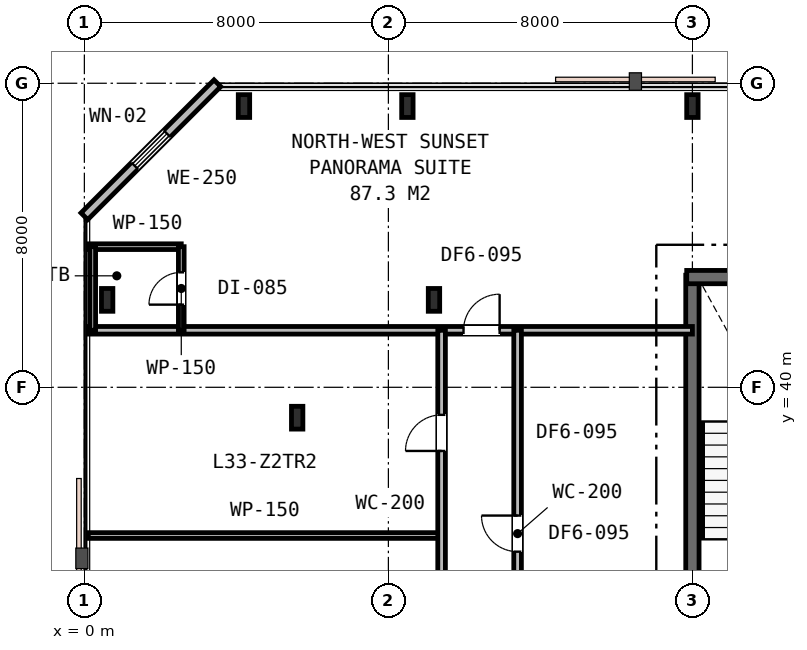
"""IFC4 building model, lengths in metres.
Left out: names, types, materials, properties, quantities, classifications, styles, units other than length and angle.
Written with IfcOpenShell. Run it as: python <this file> out.ifc"""

import sys

from ifc_helpers import new_model, si_unit, direction, frame, frame_2d, origin, origin_2d, place, context, subcontext, project, spatial, rectangle, i_section, extrude, element, fill, save


model = new_model("IFC4")
c1 = context("Model", 3, precision=1e-05, world=origin(), true_north=direction((0.0, 1.0)))
c2 = subcontext(c1, "Body", "Model", "MODEL_VIEW")
j1 = project(units=[si_unit("LENGTHUNIT", "METRE"), si_unit("PLANEANGLEUNIT", "RADIAN")], contexts=[c1])
p1 = place(None, origin())
s1 = spatial("IfcSite", under=j1, at=p1, CompositionType="ELEMENT")
p2 = place(p1, origin())
s2 = spatial("IfcBuilding", under=s1, at=p2, CompositionType="ELEMENT")
p3 = place(p2, frame((0.0, 0.0, 129.6)))
s3 = spatial("IfcBuildingStorey", under=s2, at=p3, CompositionType="ELEMENT", Elevation=129.6)
p4 = place(p3, frame((16.0, 30.65, 0.0), z_axis=(0.0, 0.0, 1.0), x_axis=(0.0, 1.0, 0.0)))
e1 = element("IfcWall", 1, at=p4, inside=s3, PredefinedType="SHEAR", context=c2, shape_type="SweptSolid", body=[
    extrude(rectangle(XDim=12.3, YDim=0.35, at=frame_2d((6.15, 0.0))), origin(), (0.0, 0.0, 1.0), 3.6),
])
p5 = place(p3, frame((15.85, 42.9, 0.0), z_axis=(0.0, 0.0, 1.0), x_axis=(1.0, 0.0, 0.0)))
e2 = element("IfcWall", 2, at=p5, inside=s3, PredefinedType="SHEAR", context=c2, shape_type="SweptSolid", body=[
    extrude(rectangle(XDim=24.3, YDim=0.35, at=frame_2d((12.15, 0.0))), origin(), (0.0, 0.0, 1.0), 3.6),
])
for number, where, z_axis, x_axis in (
    (3, (5.6, 39.2, 0.0), (0.0, 0.0, 1.0), (1.0, 0.0, 0.0)),
    (4, (9.2, 42.3, 0.0), (0.0, 0.0, 1.0), (1.0, 0.0, 0.0)),
    (5, (0.6, 42.3, 0.0), (0.0, 0.0, 1.0), (1.0, 0.0, 0.0)),
    (6, (4.2, 47.4, 0.0), (0.0, 0.0, 1.0), (1.0, 0.0, 0.0)),
    (7, (8.5, 47.4, 0.0), (0.0, 0.0, 1.0), (1.0, 0.0, 0.0)),
    (8, (16.0, 47.4, 0.0), (0.0, 0.0, 1.0), (1.0, 0.0, 0.0)),
):
    element("IfcColumn", number, at=place(p3, frame(where, z_axis=z_axis, x_axis=x_axis)), inside=s3, PredefinedType="COLUMN", context=c2, shape_type="SweptSolid", body=[
        extrude(i_section(OverallWidth=0.3, OverallDepth=0.6, WebThickness=0.015, FlangeThickness=0.03, FilletRadius=0.027, at=origin_2d()), origin(), (0.0, 0.0, 1.0), 3.6),
    ])
p6 = place(p3, frame((3.5, 48.0, 0.0), z_axis=(0.0, 0.0, 1.0), x_axis=(-0.707106781187, -0.707106781187, 0.0)))
e9 = element("IfcWall", 9, at=p6, inside=s3, PredefinedType="STANDARD", context=c2, shape_type="SweptSolid", body=[
    extrude(rectangle(XDim=4.95, YDim=0.25, at=frame_2d((2.475, 0.0))), origin(), (0.0, 0.0, 1.0), 3.33),
])
p7 = place(p6, frame((1.875, 0.0, 0.85)))
e10 = element("IfcOpeningElement", 10, at=p7, cuts=e9, PredefinedType="OPENING", context=c2, shape_type="SweptSolid", body=[
    extrude(rectangle(XDim=1.2, YDim=1.6, at=frame_2d((0.6, 0.8))), frame((0.0, 0.135, 0.0), z_axis=(0.0, -1.0, 0.0), x_axis=(1.0, 0.0, 0.0)), (0.0, 0.0, 1.0), 0.27),
])
p8 = place(p3, frame((0.1, 41.5, 0.0), z_axis=(0.0, 0.0, 1.0), x_axis=(1.0, 0.0, 0.0)))
e11 = element("IfcWall", 11, at=p8, inside=s3, PredefinedType="PARTITIONING", context=c2, shape_type="SweptSolid", body=[
    extrude(rectangle(XDim=15.9, YDim=0.2, at=frame_2d((7.95, 0.0))), origin(), (0.0, 0.0, 1.0), 2.87),
])
p9 = place(p8, frame((9.877, 0.0, 0.0)))
e12 = element("IfcOpeningElement", 12, at=p9, cuts=e11, PredefinedType="OPENING", context=c2, shape_type="SweptSolid", body=[
    extrude(rectangle(XDim=0.95, YDim=2.15, at=frame_2d((0.475, 1.075))), frame((0.0, 0.11, 0.0), z_axis=(0.0, -1.0, 0.0), x_axis=(1.0, 0.0, 0.0)), (0.0, 0.0, 1.0), 0.22),
])
p10 = place(p3, frame((0.1, 43.7, 0.0), z_axis=(0.0, 0.0, 1.0), x_axis=(1.0, 0.0, 0.0)))
e13 = element("IfcWall", 13, at=p10, inside=s3, PredefinedType="PARTITIONING", context=c2, shape_type="SweptSolid", body=[
    extrude(rectangle(XDim=2.45, YDim=0.15, at=frame_2d((1.225, 0.0))), origin(), (0.0, 0.0, 1.0), 3.33),
])
p11 = place(p3, frame((2.55, 41.5, 0.0), z_axis=(0.0, 0.0, 1.0), x_axis=(0.0, 1.0, 0.0)))
e14 = element("IfcWall", 14, at=p11, inside=s3, PredefinedType="PARTITIONING", context=c2, shape_type="SweptSolid", body=[
    extrude(rectangle(XDim=2.2, YDim=0.15, at=frame_2d((1.1, 0.0))), origin(), (0.0, 0.0, 1.0), 2.87),
])
p12 = place(p11, frame((0.675, 0.0, 0.0)))
e15 = element("IfcOpeningElement", 15, at=p12, cuts=e14, PredefinedType="OPENING", context=c2, shape_type="SweptSolid", body=[
    extrude(rectangle(XDim=0.85, YDim=2.15, at=frame_2d((0.425, 1.075))), frame((0.0, 0.085, 0.0), z_axis=(0.0, -1.0, 0.0), x_axis=(1.0, 0.0, 0.0)), (0.0, 0.0, 1.0), 0.17),
])
p13 = place(p3, frame((0.22, 41.5, 0.0), z_axis=(0.0, 0.0, 1.0), x_axis=(0.0, 1.0, 0.0)))
e16 = element("IfcWall", 16, at=p13, inside=s3, PredefinedType="PARTITIONING", context=c2, shape_type="SweptSolid", body=[
    extrude(rectangle(XDim=2.2, YDim=0.15, at=frame_2d((1.1, 0.0))), origin(), (0.0, 0.0, 1.0), 2.87),
])
p14 = place(p3, frame((0.1, 36.1, 0.0), z_axis=(0.0, 0.0, 1.0), x_axis=(1.0, 0.0, 0.0)))
e17 = element("IfcWall", 17, at=p14, inside=s3, PredefinedType="PARTITIONING", context=c2, shape_type="SweptSolid", body=[
    extrude(rectangle(XDim=9.3, YDim=0.15, at=frame_2d((4.65, 0.0))), origin(), (0.0, 0.0, 1.0), 2.87),
])
p15 = place(p3, frame((9.4, 30.8, 0.0), z_axis=(0.0, 0.0, 1.0), x_axis=(0.0, 1.0, 0.0)))
e18 = element("IfcWall", 18, at=p15, inside=s3, PredefinedType="PARTITIONING", context=c2, shape_type="SweptSolid", body=[
    extrude(rectangle(XDim=10.7, YDim=0.2, at=frame_2d((5.35, 0.0))), origin(), (0.0, 0.0, 1.0), 2.87),
])
p16 = place(p15, frame((2.175, 0.0, 0.0)))
e19 = element("IfcOpeningElement", 19, at=p16, cuts=e18, PredefinedType="OPENING", context=c2, shape_type="SweptSolid", body=[
    extrude(rectangle(XDim=0.95, YDim=2.15, at=frame_2d((0.475, 1.075))), frame((0.0, 0.11, 0.0), z_axis=(0.0, -1.0, 0.0), x_axis=(1.0, 0.0, 0.0)), (0.0, 0.0, 1.0), 0.22),
])
p17 = place(p15, frame((7.525, 0.0, 0.0)))
e20 = element("IfcOpeningElement", 20, at=p17, cuts=e18, PredefinedType="OPENING", context=c2, shape_type="SweptSolid", body=[
    extrude(rectangle(XDim=0.95, YDim=2.15, at=frame_2d((0.475, 1.075))), frame((0.0, 0.11, 0.0), z_axis=(0.0, -1.0, 0.0), x_axis=(1.0, 0.0, 0.0)), (0.0, 0.0, 1.0), 0.22),
])
p18 = place(p3, frame((11.4, 30.8, 0.0), z_axis=(0.0, 0.0, 1.0), x_axis=(0.0, 1.0, 0.0)))
e21 = element("IfcWall", 21, at=p18, inside=s3, PredefinedType="PARTITIONING", context=c2, shape_type="SweptSolid", body=[
    extrude(rectangle(XDim=10.7, YDim=0.2, at=frame_2d((5.35, 0.0))), origin(), (0.0, 0.0, 1.0), 2.87),
])
p19 = place(p18, frame((4.875, 0.0, 0.0)))
e22 = element("IfcOpeningElement", 22, at=p19, cuts=e21, PredefinedType="OPENING", context=c2, shape_type="SweptSolid", body=[
    extrude(rectangle(XDim=0.95, YDim=2.15, at=frame_2d((0.475, 1.075))), frame((0.0, 0.11, 0.0), z_axis=(0.0, -1.0, 0.0), x_axis=(1.0, 0.0, 0.0)), (0.0, 0.0, 1.0), 0.22),
])
p20 = place(p7, origin())
e23 = element("IfcWindow", 23, at=p20, inside=s3, PartitioningType="SINGLE_PANEL", PredefinedType="WINDOW", context=c2, shape_type="SweptSolid", body=[
    extrude(rectangle(XDim=1.2, YDim=1.6, at=frame_2d((0.6, 0.8))), frame((0.0, 0.03, 0.0), z_axis=(0.0, -1.0, 0.0), x_axis=(1.0, 0.0, 0.0)), (0.0, 0.0, 1.0), 0.06),
])
fill(e10, e23)
p21 = place(p9, origin())
e24 = element("IfcDoor", 24, at=p21, inside=s3, OperationType="SINGLE_SWING_RIGHT", PredefinedType="DOOR", context=c2, shape_type="SweptSolid", body=[
    extrude(rectangle(XDim=0.95, YDim=2.15, at=frame_2d((0.475, 1.075))), frame((0.0, 0.025, 0.0), z_axis=(0.0, -1.0, 0.0), x_axis=(1.0, 0.0, 0.0)), (0.0, 0.0, 1.0), 0.05),
])
fill(e12, e24)
p22 = place(p12, origin())
e25 = element("IfcDoor", 25, at=p22, inside=s3, OperationType="SINGLE_SWING_LEFT", PredefinedType="DOOR", context=c2, shape_type="SweptSolid", body=[
    extrude(rectangle(XDim=0.85, YDim=2.15, at=frame_2d((0.425, 1.075))), frame((0.0, 0.025, 0.0), z_axis=(0.0, -1.0, 0.0), x_axis=(1.0, 0.0, 0.0)), (0.0, 0.0, 1.0), 0.05),
])
fill(e15, e25)
p23 = place(p17, origin())
e26 = element("IfcDoor", 26, at=p23, inside=s3, OperationType="SINGLE_SWING_LEFT", PredefinedType="DOOR", context=c2, shape_type="SweptSolid", body=[
    extrude(rectangle(XDim=0.95, YDim=2.15, at=frame_2d((0.475, 1.075))), frame((0.0, 0.025, 0.0), z_axis=(0.0, -1.0, 0.0), x_axis=(1.0, 0.0, 0.0)), (0.0, 0.0, 1.0), 0.05),
])
fill(e20, e26)
p24 = place(p19, origin())
e27 = element("IfcDoor", 27, at=p24, inside=s3, OperationType="SINGLE_SWING_RIGHT", PredefinedType="DOOR", context=c2, shape_type="SweptSolid", body=[
    extrude(rectangle(XDim=0.95, YDim=2.15, at=frame_2d((0.475, 1.075))), frame((0.0, 0.025, 0.0), z_axis=(0.0, -1.0, 0.0), x_axis=(1.0, 0.0, 0.0)), (0.0, 0.0, 1.0), 0.05),
])
fill(e22, e27)
save(model, sys.argv[1])
